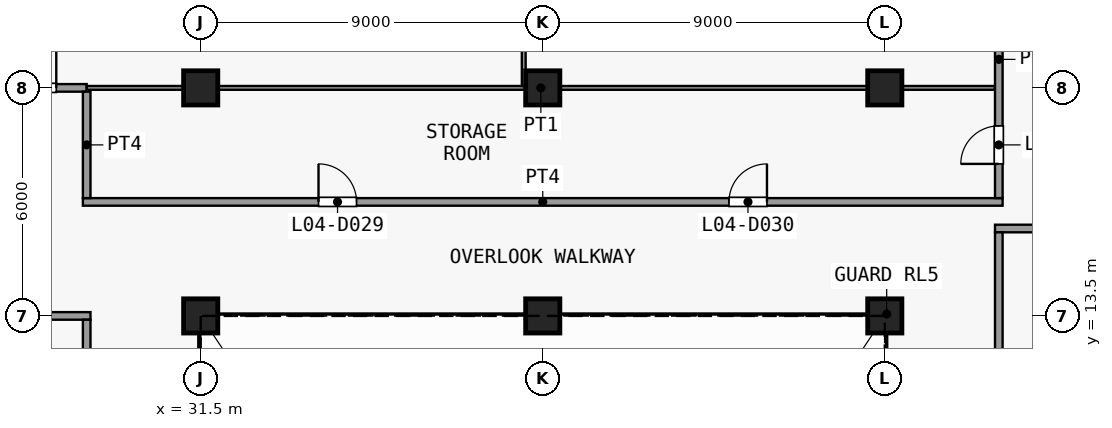
"""IFC4 building model, lengths in metres.
Left out: names, types, materials, properties, quantities, classifications, styles, units other than length and angle.
Written with IfcOpenShell. Run it as: python <this file> out.ifc"""

import sys

from ifc_helpers import new_model, si_unit, direction, frame, frame_2d, origin, origin_2d, place, context, subcontext, project, spatial, rectangle, extrude, element, fill, save


model = new_model("IFC4")
c1 = context("Model", 3, precision=1e-05, world=origin(), true_north=direction((0.0, 1.0)))
c2 = subcontext(c1, "Body", "Model", "MODEL_VIEW")
j1 = project(units=[si_unit("LENGTHUNIT", "METRE"), si_unit("PLANEANGLEUNIT", "RADIAN")], contexts=[c1])
p1 = place(None, origin())
s1 = spatial("IfcSite", under=j1, at=p1, CompositionType="ELEMENT")
p2 = place(p1, origin())
s2 = spatial("IfcBuilding", under=s1, at=p2, CompositionType="ELEMENT")
p3 = place(p2, frame((0.0, 0.0, 23.5)))
s3 = spatial("IfcBuildingStorey", under=s2, at=p3, CompositionType="ELEMENT", Elevation=23.5)
for number, where, z_axis, x_axis in (
    (1, (31.5, 13.5, 0.0), (0.0, 0.0, 1.0), (1.0, 0.0, 0.0)),
    (2, (31.5, 19.5, 0.0), (0.0, 0.0, 1.0), (1.0, 0.0, 0.0)),
    (3, (40.5, 13.5, 0.0), (0.0, 0.0, 1.0), (1.0, 0.0, 0.0)),
    (4, (40.5, 19.5, 0.0), (0.0, 0.0, 1.0), (1.0, 0.0, 0.0)),
    (5, (49.5, 13.5, 0.0), (0.0, 0.0, 1.0), (1.0, 0.0, 0.0)),
    (6, (49.5, 19.5, 0.0), (0.0, 0.0, 1.0), (1.0, 0.0, 0.0)),
):
    element("IfcColumn", number, at=place(p3, frame(where, z_axis=z_axis, x_axis=x_axis)), inside=s3, PredefinedType="COLUMN", context=c2, shape_type="SweptSolid", body=[
        extrude(rectangle(XDim=0.9, YDim=0.9, at=origin_2d()), origin(), (0.0, 0.0, 1.0), 4.5),
    ])
p4 = place(p3, frame((20.3, 13.5, 0.0), z_axis=(0.0, 0.0, 1.0), x_axis=(1.0, 0.0, 0.0)))
e7 = element("IfcWall", 7, at=p4, inside=s3, PredefinedType="PARTITIONING", context=c2, shape_type="SweptSolid", body=[
    extrude(rectangle(XDim=8.3, YDim=0.2, at=frame_2d((4.15, 0.0))), origin(), (0.0, 0.0, 1.0), 4.15),
])
p5 = place(p4, frame((3.7, 0.0, 0.0)))
e8 = element("IfcOpeningElement", 8, at=p5, cuts=e7, PredefinedType="OPENING", context=c2, shape_type="SweptSolid", body=[
    extrude(rectangle(XDim=1.0, YDim=2.1, at=frame_2d((0.5, 1.05))), frame((0.0, 0.11, 0.0), z_axis=(0.0, -1.0, 0.0), x_axis=(1.0, 0.0, 0.0)), (0.0, 0.0, 1.0), 0.22),
])
p6 = place(p3, frame((52.4, 15.8, 0.0), z_axis=(0.0, 0.0, 1.0), x_axis=(1.0, 0.0, 0.0)))
e9 = element("IfcWall", 9, at=p6, inside=s3, PredefinedType="PARTITIONING", context=c2, shape_type="SweptSolid", body=[
    extrude(rectangle(XDim=6.2, YDim=0.2, at=frame_2d((3.1, 0.0))), origin(), (0.0, 0.0, 1.0), 4.15),
])
p7 = place(p3, frame((28.4, 16.5, 0.0), z_axis=(0.0, 0.0, 1.0), x_axis=(1.0, 0.0, 0.0)))
e10 = element("IfcWall", 10, at=p7, inside=s3, PredefinedType="PARTITIONING", context=c2, shape_type="SweptSolid", body=[
    extrude(rectangle(XDim=24.2, YDim=0.2, at=frame_2d((12.1, 0.0))), origin(), (0.0, 0.0, 1.0), 4.15),
])
p8 = place(p7, frame((6.2, 0.0, 0.0)))
e11 = element("IfcOpeningElement", 11, at=p8, cuts=e10, PredefinedType="OPENING", context=c2, shape_type="SweptSolid", body=[
    extrude(rectangle(XDim=1.0, YDim=2.1, at=frame_2d((0.5, 1.05))), frame((0.0, 0.11, 0.0), z_axis=(0.0, -1.0, 0.0), x_axis=(1.0, 0.0, 0.0)), (0.0, 0.0, 1.0), 0.22),
])
p9 = place(p7, frame((17.0, 0.0, 0.0)))
e12 = element("IfcOpeningElement", 12, at=p9, cuts=e10, PredefinedType="OPENING", context=c2, shape_type="SweptSolid", body=[
    extrude(rectangle(XDim=1.0, YDim=2.1, at=frame_2d((0.5, 1.05))), frame((0.0, 0.11, 0.0), z_axis=(0.0, -1.0, 0.0), x_axis=(1.0, 0.0, 0.0)), (0.0, 0.0, 1.0), 0.22),
])
p10 = place(p3, frame((-31.6, 19.5, 0.0), z_axis=(0.0, 0.0, 1.0), x_axis=(1.0, 0.0, 0.0)))
e13 = element("IfcWall", 13, at=p10, inside=s3, PredefinedType="PARTITIONING", context=c2, shape_type="SweptSolid", body=[
    extrude(rectangle(XDim=60.1, YDim=0.2, at=frame_2d((30.05, 0.0))), origin(), (0.0, 0.0, 1.0), 4.15),
])
p11 = place(p10, frame((7.2, 0.0, 0.0)))
e14 = element("IfcOpeningElement", 14, at=p11, cuts=e13, PredefinedType="OPENING", context=c2, shape_type="SweptSolid", body=[
    extrude(rectangle(XDim=1.0, YDim=2.1, at=frame_2d((0.5, 1.05))), frame((0.0, 0.11, 0.0), z_axis=(0.0, -1.0, 0.0), x_axis=(1.0, 0.0, 0.0)), (0.0, 0.0, 1.0), 0.22),
])
p12 = place(p10, frame((13.2, 0.0, 0.0)))
e15 = element("IfcOpeningElement", 15, at=p12, cuts=e13, PredefinedType="OPENING", context=c2, shape_type="SweptSolid", body=[
    extrude(rectangle(XDim=1.0, YDim=2.1, at=frame_2d((0.5, 1.05))), frame((0.0, 0.11, 0.0), z_axis=(0.0, -1.0, 0.0), x_axis=(1.0, 0.0, 0.0)), (0.0, 0.0, 1.0), 0.22),
])
p13 = place(p10, frame((25.2, 0.0, 0.0)))
e16 = element("IfcOpeningElement", 16, at=p13, cuts=e13, PredefinedType="OPENING", context=c2, shape_type="SweptSolid", body=[
    extrude(rectangle(XDim=1.0, YDim=2.1, at=frame_2d((0.5, 1.05))), frame((0.0, 0.11, 0.0), z_axis=(0.0, -1.0, 0.0), x_axis=(1.0, 0.0, 0.0)), (0.0, 0.0, 1.0), 0.22),
])
p14 = place(p10, frame((33.5, 0.0, 0.0)))
e17 = element("IfcOpeningElement", 17, at=p14, cuts=e13, PredefinedType="OPENING", context=c2, shape_type="SweptSolid", body=[
    extrude(rectangle(XDim=1.8, YDim=2.1, at=frame_2d((0.9, 1.05))), frame((0.0, 0.11, 0.0), z_axis=(0.0, -1.0, 0.0), x_axis=(1.0, 0.0, 0.0)), (0.0, 0.0, 1.0), 0.22),
])
p15 = place(p10, frame((49.0, 0.0, 0.0)))
e18 = element("IfcOpeningElement", 18, at=p15, cuts=e13, PredefinedType="OPENING", context=c2, shape_type="SweptSolid", body=[
    extrude(rectangle(XDim=1.8, YDim=2.1, at=frame_2d((0.9, 1.05))), frame((0.0, 0.11, 0.0), z_axis=(0.0, -1.0, 0.0), x_axis=(1.0, 0.0, 0.0)), (0.0, 0.0, 1.0), 0.22),
])
p16 = place(p10, frame((55.0, 0.0, 0.0)))
e19 = element("IfcOpeningElement", 19, at=p16, cuts=e13, PredefinedType="OPENING", context=c2, shape_type="SweptSolid", body=[
    extrude(rectangle(XDim=1.0, YDim=2.1, at=frame_2d((0.5, 1.05))), frame((0.0, 0.11, 0.0), z_axis=(0.0, -1.0, 0.0), x_axis=(1.0, 0.0, 0.0)), (0.0, 0.0, 1.0), 0.22),
])
p17 = place(p10, frame((58.3, 0.0, 0.0)))
e20 = element("IfcOpeningElement", 20, at=p17, cuts=e13, PredefinedType="OPENING", context=c2, shape_type="SweptSolid", body=[
    extrude(rectangle(XDim=1.0, YDim=2.1, at=frame_2d((0.5, 1.05))), frame((0.0, 0.11, 0.0), z_axis=(0.0, -1.0, 0.0), x_axis=(1.0, 0.0, 0.0)), (0.0, 0.0, 1.0), 0.22),
])
p18 = place(p3, frame((28.5, 19.5, 0.0), z_axis=(0.0, 0.0, 1.0), x_axis=(1.0, 0.0, 0.0)))
e21 = element("IfcWall", 21, at=p18, inside=s3, PredefinedType="PARTITIONING", context=c2, shape_type="SweptSolid", body=[
    extrude(rectangle(XDim=23.9, YDim=0.1, at=frame_2d((11.95, 0.0))), origin(), (0.0, 0.0, 1.0), 4.15),
])
p19 = place(p3, frame((28.5, 1.6, 0.0), z_axis=(0.0, 0.0, 1.0), x_axis=(0.0, 1.0, 0.0)))
e22 = element("IfcWall", 22, at=p19, inside=s3, PredefinedType="PARTITIONING", context=c2, shape_type="SweptSolid", body=[
    extrude(rectangle(XDim=11.8, YDim=0.2, at=frame_2d((5.9, 0.0))), origin(), (0.0, 0.0, 1.0), 4.15),
])
p20 = place(p3, frame((28.5, 16.6, 0.0), z_axis=(0.0, 0.0, 1.0), x_axis=(0.0, 1.0, 0.0)))
e23 = element("IfcWall", 23, at=p20, inside=s3, PredefinedType="PARTITIONING", context=c2, shape_type="SweptSolid", body=[
    extrude(rectangle(XDim=2.8, YDim=0.2, at=frame_2d((1.4, 0.0))), origin(), (0.0, 0.0, 1.0), 4.15),
])
p21 = place(p3, frame((40.0, 19.55, 0.0), z_axis=(0.0, 0.0, 1.0), x_axis=(0.0, 1.0, 0.0)))
e24 = element("IfcWall", 24, at=p21, inside=s3, PredefinedType="PARTITIONING", context=c2, shape_type="SweptSolid", body=[
    extrude(rectangle(XDim=5.9, YDim=0.1, at=frame_2d((2.95, 0.0))), origin(), (0.0, 0.0, 1.0), 4.15),
])
p22 = place(p3, frame((52.5, -16.5, 0.0), z_axis=(0.0, 0.0, 1.0), x_axis=(0.0, 1.0, 0.0)))
e25 = element("IfcWall", 25, at=p22, inside=s3, PredefinedType="PARTITIONING", context=c2, shape_type="SweptSolid", body=[
    extrude(rectangle(XDim=32.2, YDim=0.2, at=frame_2d((16.1, 0.0))), origin(), (0.0, 0.0, 1.0), 4.15),
])
p23 = place(p3, frame((52.5, 16.6, 0.0), z_axis=(0.0, 0.0, 1.0), x_axis=(0.0, 1.0, 0.0)))
e26 = element("IfcWall", 26, at=p23, inside=s3, PredefinedType="PARTITIONING", context=c2, shape_type="SweptSolid", body=[
    extrude(rectangle(XDim=8.87, YDim=0.2, at=frame_2d((4.435, 0.0))), origin(), (0.0, 0.0, 1.0), 4.15),
])
p24 = place(p23, frame((0.9, 0.0, 0.0)))
e27 = element("IfcOpeningElement", 27, at=p24, cuts=e26, PredefinedType="OPENING", context=c2, shape_type="SweptSolid", body=[
    extrude(rectangle(XDim=1.0, YDim=2.1, at=frame_2d((0.5, 1.05))), frame((0.0, 0.11, 0.0), z_axis=(0.0, -1.0, 0.0), x_axis=(1.0, 0.0, 0.0)), (0.0, 0.0, 1.0), 0.22),
])
p25 = place(p23, frame((5.4, 0.0, 0.0)))
e28 = element("IfcOpeningElement", 28, at=p25, cuts=e26, PredefinedType="OPENING", context=c2, shape_type="SweptSolid", body=[
    extrude(rectangle(XDim=1.0, YDim=2.1, at=frame_2d((0.5, 1.05))), frame((0.0, 0.11, 0.0), z_axis=(0.0, -1.0, 0.0), x_axis=(1.0, 0.0, 0.0)), (0.0, 0.0, 1.0), 0.22),
])
p26 = place(p8, origin())
e29 = element("IfcDoor", 29, at=p26, inside=s3, OperationType="SINGLE_SWING_RIGHT", PredefinedType="DOOR", context=c2, shape_type="SweptSolid", body=[
    extrude(rectangle(XDim=1.0, YDim=2.1, at=frame_2d((0.5, 1.05))), frame((0.0, 0.025, 0.0), z_axis=(0.0, -1.0, 0.0), x_axis=(1.0, 0.0, 0.0)), (0.0, 0.0, 1.0), 0.05),
])
fill(e11, e29)
p27 = place(p9, origin())
e30 = element("IfcDoor", 30, at=p27, inside=s3, OperationType="SINGLE_SWING_LEFT", PredefinedType="DOOR", context=c2, shape_type="SweptSolid", body=[
    extrude(rectangle(XDim=1.0, YDim=2.1, at=frame_2d((0.5, 1.05))), frame((0.0, 0.025, 0.0), z_axis=(0.0, -1.0, 0.0), x_axis=(1.0, 0.0, 0.0)), (0.0, 0.0, 1.0), 0.05),
])
fill(e12, e30)
p28 = place(p17, origin())
e31 = element("IfcDoor", 31, at=p28, inside=s3, OperationType="SINGLE_SWING_LEFT", PredefinedType="DOOR", context=c2, shape_type="SweptSolid", body=[
    extrude(rectangle(XDim=1.0, YDim=2.1, at=frame_2d((0.5, 1.05))), frame((0.0, 0.025, 0.0), z_axis=(0.0, -1.0, 0.0), x_axis=(1.0, 0.0, 0.0)), (0.0, 0.0, 1.0), 0.05),
])
fill(e20, e31)
p29 = place(p24, origin())
e32 = element("IfcDoor", 32, at=p29, inside=s3, OperationType="SINGLE_SWING_RIGHT", PredefinedType="DOOR", context=c2, shape_type="SweptSolid", body=[
    extrude(rectangle(XDim=1.0, YDim=2.1, at=frame_2d((0.5, 1.05))), frame((0.0, 0.025, 0.0), z_axis=(0.0, -1.0, 0.0), x_axis=(1.0, 0.0, 0.0)), (0.0, 0.0, 1.0), 0.05),
])
fill(e27, e32)
save(model, sys.argv[1])
